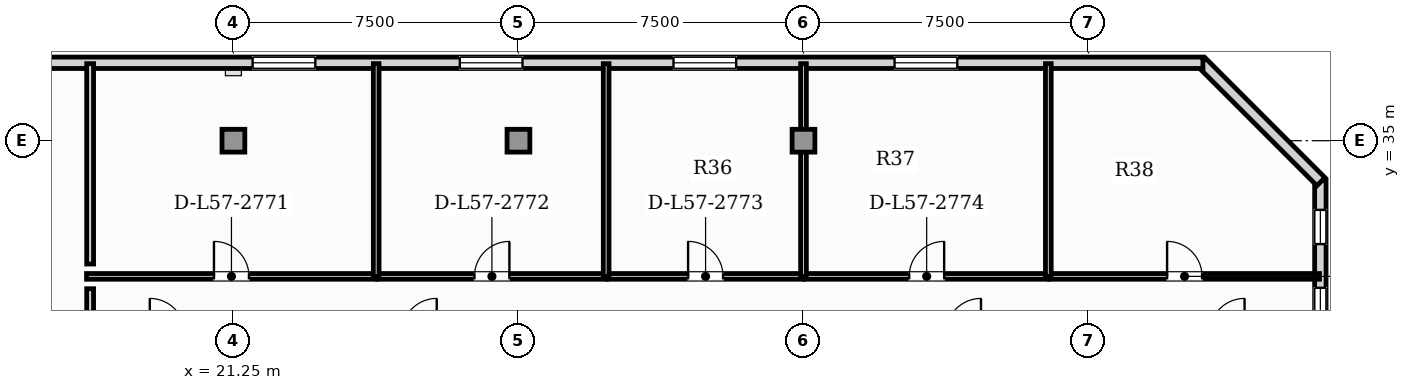
"""IFC4 building model, lengths in metres.
Left out: names, types, materials, properties, quantities, classifications, styles, units other than length and angle.
Written with IfcOpenShell. Run it as: python <this file> out.ifc"""

import sys

from ifc_helpers import new_model, si_unit, direction, frame, frame_2d, origin, origin_2d, place, context, subcontext, project, spatial, rectangle, extrude, element, fill, save


model = new_model("IFC4")
c1 = context("Model", 3, precision=1e-05, world=origin(), true_north=direction((0.0, 1.0)))
c2 = subcontext(c1, "Body", "Model", "MODEL_VIEW")
j1 = project(units=[si_unit("LENGTHUNIT", "METRE"), si_unit("PLANEANGLEUNIT", "RADIAN")], contexts=[c1])
p1 = place(None, origin())
s1 = spatial("IfcSite", under=j1, at=p1, CompositionType="ELEMENT")
p2 = place(p1, origin())
s2 = spatial("IfcBuilding", under=s1, at=p2, CompositionType="ELEMENT")
p3 = place(p2, frame((0.0, 0.0, 231.1)))
s3 = spatial("IfcBuildingStorey", under=s2, at=p3, CompositionType="ELEMENT", Elevation=231.1)
for number, where, z_axis, x_axis in (
    (1, (21.25, 35.0, 0.0), (0.0, 0.0, 1.0), (1.0, 0.0, 0.0)),
    (2, (28.75, 35.0, 0.0), (0.0, 0.0, 1.0), (1.0, 0.0, 0.0)),
    (3, (36.25, 35.0, 0.0), (0.0, 0.0, 1.0), (1.0, 0.0, 0.0)),
):
    element("IfcColumn", number, at=place(p3, frame(where, z_axis=z_axis, x_axis=x_axis)), inside=s3, PredefinedType="COLUMN", context=c2, shape_type="SweptSolid", body=[
        extrude(rectangle(XDim=0.6, YDim=0.6, at=origin_2d()), origin(), (0.0, 0.0, 1.0), 3.85),
    ])
p4 = place(p3, frame((49.85, 3.24, 0.0), z_axis=(0.0, 0.0, 1.0), x_axis=(0.0, 1.0, 0.0)))
e4 = element("IfcWall", 4, at=p4, inside=s3, PredefinedType="SOLIDWALL", context=c2, shape_type="SweptSolid", body=[
    extrude(rectangle(XDim=30.72, YDim=0.3, at=frame_2d((15.36, 0.0))), origin(), (0.0, 0.0, 1.0), 3.63),
])
p5 = place(p4, frame((26.99, 0.0, 0.95)))
e5 = element("IfcOpeningElement", 5, at=p5, cuts=e4, PredefinedType="OPENING", context=c2, shape_type="SweptSolid", body=[
    extrude(rectangle(XDim=0.9, YDim=1.5, at=frame_2d((0.45, 0.75))), frame((0.0, 0.16, 0.0), z_axis=(0.0, -1.0, 0.0), x_axis=(1.0, 0.0, 0.0)), (0.0, 0.0, 1.0), 0.32),
])
p6 = place(p4, frame((10.966, 0.0, 0.88)))
e6 = element("IfcOpeningElement", 6, at=p6, cuts=e4, PredefinedType="OPENING", context=c2, shape_type="SweptSolid", body=[
    extrude(rectangle(XDim=1.65, YDim=2.0, at=frame_2d((0.825, 1.0))), frame((0.0, 0.16, 0.0), z_axis=(0.0, -1.0, 0.0), x_axis=(1.0, 0.0, 0.0)), (0.0, 0.0, 1.0), 0.32),
])
p7 = place(p4, frame((14.99, 0.0, 0.88)))
e7 = element("IfcOpeningElement", 7, at=p7, cuts=e4, PredefinedType="OPENING", context=c2, shape_type="SweptSolid", body=[
    extrude(rectangle(XDim=1.65, YDim=2.0, at=frame_2d((0.825, 1.0))), frame((0.0, 0.16, 0.0), z_axis=(0.0, -1.0, 0.0), x_axis=(1.0, 0.0, 0.0)), (0.0, 0.0, 1.0), 0.32),
])
p8 = place(p4, frame((21.809, 0.0, 0.88)))
e8 = element("IfcOpeningElement", 8, at=p8, cuts=e4, PredefinedType="OPENING", context=c2, shape_type="SweptSolid", body=[
    extrude(rectangle(XDim=1.65, YDim=2.0, at=frame_2d((0.825, 1.0))), frame((0.0, 0.16, 0.0), z_axis=(0.0, -1.0, 0.0), x_axis=(1.0, 0.0, 0.0)), (0.0, 0.0, 1.0), 0.32),
])
p9 = place(p4, frame((29.04, 0.0, 0.95)))
e9 = element("IfcOpeningElement", 9, at=p9, cuts=e4, PredefinedType="OPENING", context=c2, shape_type="SweptSolid", body=[
    extrude(rectangle(XDim=0.9, YDim=1.5, at=frame_2d((0.45, 0.75))), frame((0.0, 0.16, 0.0), z_axis=(0.0, -1.0, 0.0), x_axis=(1.0, 0.0, 0.0)), (0.0, 0.0, 1.0), 0.32),
])
p10 = place(p3, frame((49.865, 33.922, 0.0), z_axis=(0.0, 0.0, 1.0), x_axis=(-0.707079321262, 0.707134240044, 0.0)))
e10 = element("IfcWall", 10, at=p10, inside=s3, PredefinedType="SOLIDWALL", context=c2, shape_type="SweptSolid", body=[
    extrude(rectangle(XDim=4.446, YDim=0.3, at=frame_2d((2.223, 0.0))), origin(), (0.0, 0.0, 1.0), 3.63),
])
p11 = place(p3, frame((46.76, 37.05, 0.0), z_axis=(0.0, 0.0, 1.0), x_axis=(-1.0, 0.0, 0.0)))
e11 = element("IfcWall", 11, at=p11, inside=s3, PredefinedType="SOLIDWALL", context=c2, shape_type="SweptSolid", body=[
    extrude(rectangle(XDim=36.02, YDim=0.3, at=frame_2d((18.01, 0.0))), origin(), (0.0, 0.0, 1.0), 3.63),
])
p12 = place(p11, frame((32.262, 0.0, 0.88)))
e12 = element("IfcOpeningElement", 12, at=p12, cuts=e11, PredefinedType="OPENING", context=c2, shape_type="SweptSolid", body=[
    extrude(rectangle(XDim=1.65, YDim=2.0, at=frame_2d((0.825, 1.0))), frame((0.0, 0.16, 0.0), z_axis=(0.0, -1.0, 0.0), x_axis=(1.0, 0.0, 0.0)), (0.0, 0.0, 1.0), 0.32),
])
p13 = place(p11, frame((23.355, 0.0, 0.88)))
e13 = element("IfcOpeningElement", 13, at=p13, cuts=e11, PredefinedType="OPENING", context=c2, shape_type="SweptSolid", body=[
    extrude(rectangle(XDim=1.65, YDim=2.0, at=frame_2d((0.825, 1.0))), frame((0.0, 0.16, 0.0), z_axis=(0.0, -1.0, 0.0), x_axis=(1.0, 0.0, 0.0)), (0.0, 0.0, 1.0), 0.32),
])
p14 = place(p11, frame((17.903, 0.0, 0.88)))
e14 = element("IfcOpeningElement", 14, at=p14, cuts=e11, PredefinedType="OPENING", context=c2, shape_type="SweptSolid", body=[
    extrude(rectangle(XDim=1.65, YDim=2.0, at=frame_2d((0.825, 1.0))), frame((0.0, 0.16, 0.0), z_axis=(0.0, -1.0, 0.0), x_axis=(1.0, 0.0, 0.0)), (0.0, 0.0, 1.0), 0.32),
])
p15 = place(p11, frame((12.281, 0.0, 0.88)))
e15 = element("IfcOpeningElement", 15, at=p15, cuts=e11, PredefinedType="OPENING", context=c2, shape_type="SweptSolid", body=[
    extrude(rectangle(XDim=1.65, YDim=2.0, at=frame_2d((0.825, 1.0))), frame((0.0, 0.16, 0.0), z_axis=(0.0, -1.0, 0.0), x_axis=(1.0, 0.0, 0.0)), (0.0, 0.0, 1.0), 0.32),
])
p16 = place(p11, frame((6.464, 0.0, 0.88)))
e16 = element("IfcOpeningElement", 16, at=p16, cuts=e11, PredefinedType="OPENING", context=c2, shape_type="SweptSolid", body=[
    extrude(rectangle(XDim=1.65, YDim=2.0, at=frame_2d((0.825, 1.0))), frame((0.0, 0.16, 0.0), z_axis=(0.0, -1.0, 0.0), x_axis=(1.0, 0.0, 0.0)), (0.0, 0.0, 1.0), 0.32),
])
p17 = place(p3, frame((17.385, 31.43, 0.0), z_axis=(0.0, 0.0, 1.0), x_axis=(1.0, 0.0, 0.0)))
e17 = element("IfcWall", 17, at=p17, inside=s3, PredefinedType="PARTITIONING", context=c2, shape_type="SweptSolid", body=[
    extrude(rectangle(XDim=7.626, YDim=0.15, at=frame_2d((3.813, 0.0))), origin(), (0.0, 0.0, 1.0), 3.63),
])
p18 = place(p17, frame((3.353, 0.0, 0.0)))
e18 = element("IfcOpeningElement", 18, at=p18, cuts=e17, PredefinedType="OPENING", context=c2, shape_type="SweptSolid", body=[
    extrude(rectangle(XDim=0.92, YDim=2.1, at=frame_2d((0.46, 1.05))), frame((0.0, 0.085, 0.0), z_axis=(0.0, -1.0, 0.0), x_axis=(1.0, 0.0, 0.0)), (0.0, 0.0, 1.0), 0.17),
])
p19 = place(p3, frame((25.042, 31.43, 0.0), z_axis=(0.0, 0.0, 1.0), x_axis=(1.0, 0.0, 0.0)))
e19 = element("IfcWall", 19, at=p19, inside=s3, PredefinedType="PARTITIONING", context=c2, shape_type="SweptSolid", body=[
    extrude(rectangle(XDim=6.021, YDim=0.15, at=frame_2d((3.01, 0.0))), origin(), (0.0, 0.0, 1.0), 3.63),
])
p20 = place(p19, frame((2.55, 0.0, 0.0)))
e20 = element("IfcOpeningElement", 20, at=p20, cuts=e19, PredefinedType="OPENING", context=c2, shape_type="SweptSolid", body=[
    extrude(rectangle(XDim=0.92, YDim=2.1, at=frame_2d((0.46, 1.05))), frame((0.0, 0.085, 0.0), z_axis=(0.0, -1.0, 0.0), x_axis=(1.0, 0.0, 0.0)), (0.0, 0.0, 1.0), 0.17),
])
p21 = place(p3, frame((31.092, 31.43, 0.0), z_axis=(0.0, 0.0, 1.0), x_axis=(1.0, 0.0, 0.0)))
e21 = element("IfcWall", 21, at=p21, inside=s3, PredefinedType="PARTITIONING", context=c2, shape_type="SweptSolid", body=[
    extrude(rectangle(XDim=5.163, YDim=0.15, at=frame_2d((2.581, 0.0))), origin(), (0.0, 0.0, 1.0), 3.63),
])
p22 = place(p21, frame((2.121, 0.0, 0.0)))
e22 = element("IfcOpeningElement", 22, at=p22, cuts=e21, PredefinedType="OPENING", context=c2, shape_type="SweptSolid", body=[
    extrude(rectangle(XDim=0.92, YDim=2.1, at=frame_2d((0.46, 1.05))), frame((0.0, 0.085, 0.0), z_axis=(0.0, -1.0, 0.0), x_axis=(1.0, 0.0, 0.0)), (0.0, 0.0, 1.0), 0.17),
])
p23 = place(p3, frame((36.285, 31.43, 0.0), z_axis=(0.0, 0.0, 1.0), x_axis=(1.0, 0.0, 0.0)))
e23 = element("IfcWall", 23, at=p23, inside=s3, PredefinedType="PARTITIONING", context=c2, shape_type="SweptSolid", body=[
    extrude(rectangle(XDim=6.412, YDim=0.15, at=frame_2d((3.206, 0.0))), origin(), (0.0, 0.0, 1.0), 3.63),
])
p24 = place(p23, frame((2.746, 0.0, 0.0)))
e24 = element("IfcOpeningElement", 24, at=p24, cuts=e23, PredefinedType="OPENING", context=c2, shape_type="SweptSolid", body=[
    extrude(rectangle(XDim=0.92, YDim=2.1, at=frame_2d((0.46, 1.05))), frame((0.0, 0.085, 0.0), z_axis=(0.0, -1.0, 0.0), x_axis=(1.0, 0.0, 0.0)), (0.0, 0.0, 1.0), 0.17),
])
p25 = place(p3, frame((42.727, 31.43, 0.0), z_axis=(0.0, 0.0, 1.0), x_axis=(1.0, 0.0, 0.0)))
e25 = element("IfcWall", 25, at=p25, inside=s3, PredefinedType="PARTITIONING", context=c2, shape_type="SweptSolid", body=[
    extrude(rectangle(XDim=7.1, YDim=0.15, at=frame_2d((3.55, 0.0))), origin(), (0.0, 0.0, 1.0), 3.63),
])
p26 = place(p25, frame((3.09, 0.0, 0.0)))
e26 = element("IfcOpeningElement", 26, at=p26, cuts=e25, PredefinedType="OPENING", context=c2, shape_type="SweptSolid", body=[
    extrude(rectangle(XDim=0.92, YDim=2.1, at=frame_2d((0.46, 1.05))), frame((0.0, 0.085, 0.0), z_axis=(0.0, -1.0, 0.0), x_axis=(1.0, 0.0, 0.0)), (0.0, 0.0, 1.0), 0.17),
])
for number, where, z_axis, x_axis in (
    (27, (25.007, 31.425, 0.0), (0.0, 0.0, 1.0), (0.0, 1.0, 0.0)),
    (28, (31.057, 31.425, 0.0), (0.0, 0.0, 1.0), (0.0, 1.0, 0.0)),
    (29, (36.25, 31.425, 0.0), (0.0, 0.0, 1.0), (0.0, 1.0, 0.0)),
    (30, (42.692, 31.425, 0.0), (0.0, 0.0, 1.0), (0.0, 1.0, 0.0)),
):
    element("IfcWall", number, at=place(p3, frame(where, z_axis=z_axis, x_axis=x_axis)), inside=s3, PredefinedType="PARTITIONING", context=c2, shape_type="SweptSolid", body=[
        extrude(rectangle(XDim=5.603, YDim=0.15, at=frame_2d((2.801, 0.0))), origin(), (0.0, 0.0, 1.0), 3.63),
    ])
p27 = place(p3, frame((17.48, 30.255, 0.0), z_axis=(0.0, 0.0, 1.0), x_axis=(0.0, 1.0, 0.0)))
e31 = element("IfcWall", 31, at=p27, inside=s3, PredefinedType="PARTITIONING", context=c2, shape_type="SweptSolid", body=[
    extrude(rectangle(XDim=0.85, YDim=0.18, at=frame_2d((0.425, 0.0))), origin(), (0.0, 0.0, 1.0), 3.63),
])
p28 = place(p3, frame((17.48, 31.755, 0.0), z_axis=(0.0, 0.0, 1.0), x_axis=(0.0, 1.0, 0.0)))
e32 = element("IfcWall", 32, at=p28, inside=s3, PredefinedType="PARTITIONING", context=c2, shape_type="SweptSolid", body=[
    extrude(rectangle(XDim=5.273, YDim=0.18, at=frame_2d((2.636, 0.0))), origin(), (0.0, 0.0, 1.0), 3.63),
])
p29 = place(p5, origin())
e33 = element("IfcWindow", 33, at=p29, inside=s3, PartitioningType="SINGLE_PANEL", PredefinedType="WINDOW", context=c2, shape_type="SweptSolid", body=[
    extrude(rectangle(XDim=0.9, YDim=1.5, at=frame_2d((0.45, 0.75))), frame((0.0, 0.03, 0.0), z_axis=(0.0, -1.0, 0.0), x_axis=(1.0, 0.0, 0.0)), (0.0, 0.0, 1.0), 0.06),
])
fill(e5, e33)
p30 = place(p13, origin())
e34 = element("IfcWindow", 34, at=p30, inside=s3, PartitioningType="SINGLE_PANEL", PredefinedType="WINDOW", context=c2, shape_type="SweptSolid", body=[
    extrude(rectangle(XDim=1.65, YDim=2.0, at=frame_2d((0.825, 1.0))), frame((0.0, 0.03, 0.0), z_axis=(0.0, -1.0, 0.0), x_axis=(1.0, 0.0, 0.0)), (0.0, 0.0, 1.0), 0.06),
])
fill(e13, e34)
p31 = place(p14, origin())
e35 = element("IfcWindow", 35, at=p31, inside=s3, PartitioningType="SINGLE_PANEL", PredefinedType="WINDOW", context=c2, shape_type="SweptSolid", body=[
    extrude(rectangle(XDim=1.65, YDim=2.0, at=frame_2d((0.825, 1.0))), frame((0.0, 0.03, 0.0), z_axis=(0.0, -1.0, 0.0), x_axis=(1.0, 0.0, 0.0)), (0.0, 0.0, 1.0), 0.06),
])
fill(e14, e35)
p32 = place(p15, origin())
e36 = element("IfcWindow", 36, at=p32, inside=s3, PartitioningType="SINGLE_PANEL", PredefinedType="WINDOW", context=c2, shape_type="SweptSolid", body=[
    extrude(rectangle(XDim=1.65, YDim=2.0, at=frame_2d((0.825, 1.0))), frame((0.0, 0.03, 0.0), z_axis=(0.0, -1.0, 0.0), x_axis=(1.0, 0.0, 0.0)), (0.0, 0.0, 1.0), 0.06),
])
fill(e15, e36)
p33 = place(p16, origin())
e37 = element("IfcWindow", 37, at=p33, inside=s3, PartitioningType="SINGLE_PANEL", PredefinedType="WINDOW", context=c2, shape_type="SweptSolid", body=[
    extrude(rectangle(XDim=1.65, YDim=2.0, at=frame_2d((0.825, 1.0))), frame((0.0, 0.03, 0.0), z_axis=(0.0, -1.0, 0.0), x_axis=(1.0, 0.0, 0.0)), (0.0, 0.0, 1.0), 0.06),
])
fill(e16, e37)
p34 = place(p9, origin())
e38 = element("IfcWindow", 38, at=p34, inside=s3, PartitioningType="SINGLE_PANEL", PredefinedType="WINDOW", context=c2, shape_type="SweptSolid", body=[
    extrude(rectangle(XDim=0.9, YDim=1.5, at=frame_2d((0.45, 0.75))), frame((0.0, 0.03, 0.0), z_axis=(0.0, -1.0, 0.0), x_axis=(1.0, 0.0, 0.0)), (0.0, 0.0, 1.0), 0.06),
])
fill(e9, e38)
p35 = place(p18, origin())
e39 = element("IfcDoor", 39, at=p35, inside=s3, OperationType="SINGLE_SWING_LEFT", PredefinedType="DOOR", context=c2, shape_type="SweptSolid", body=[
    extrude(rectangle(XDim=0.92, YDim=2.1, at=frame_2d((0.46, 1.05))), frame((0.0, 0.025, 0.0), z_axis=(0.0, -1.0, 0.0), x_axis=(1.0, 0.0, 0.0)), (0.0, 0.0, 1.0), 0.05),
])
fill(e18, e39)
p36 = place(p20, origin())
e40 = element("IfcDoor", 40, at=p36, inside=s3, OperationType="SINGLE_SWING_RIGHT", PredefinedType="DOOR", context=c2, shape_type="SweptSolid", body=[
    extrude(rectangle(XDim=0.92, YDim=2.1, at=frame_2d((0.46, 1.05))), frame((0.0, 0.025, 0.0), z_axis=(0.0, -1.0, 0.0), x_axis=(1.0, 0.0, 0.0)), (0.0, 0.0, 1.0), 0.05),
])
fill(e20, e40)
p37 = place(p22, origin())
e41 = element("IfcDoor", 41, at=p37, inside=s3, OperationType="SINGLE_SWING_LEFT", PredefinedType="DOOR", context=c2, shape_type="SweptSolid", body=[
    extrude(rectangle(XDim=0.92, YDim=2.1, at=frame_2d((0.46, 1.05))), frame((0.0, 0.025, 0.0), z_axis=(0.0, -1.0, 0.0), x_axis=(1.0, 0.0, 0.0)), (0.0, 0.0, 1.0), 0.05),
])
fill(e22, e41)
p38 = place(p24, origin())
e42 = element("IfcDoor", 42, at=p38, inside=s3, OperationType="SINGLE_SWING_RIGHT", PredefinedType="DOOR", context=c2, shape_type="SweptSolid", body=[
    extrude(rectangle(XDim=0.92, YDim=2.1, at=frame_2d((0.46, 1.05))), frame((0.0, 0.025, 0.0), z_axis=(0.0, -1.0, 0.0), x_axis=(1.0, 0.0, 0.0)), (0.0, 0.0, 1.0), 0.05),
])
fill(e24, e42)
p39 = place(p26, origin())
e43 = element("IfcDoor", 43, at=p39, inside=s3, OperationType="SINGLE_SWING_LEFT", PredefinedType="DOOR", context=c2, shape_type="SweptSolid", body=[
    extrude(rectangle(XDim=0.92, YDim=2.1, at=frame_2d((0.46, 1.05))), frame((0.0, 0.025, 0.0), z_axis=(0.0, -1.0, 0.0), x_axis=(1.0, 0.0, 0.0)), (0.0, 0.0, 1.0), 0.05),
])
fill(e26, e43)
save(model, sys.argv[1])
